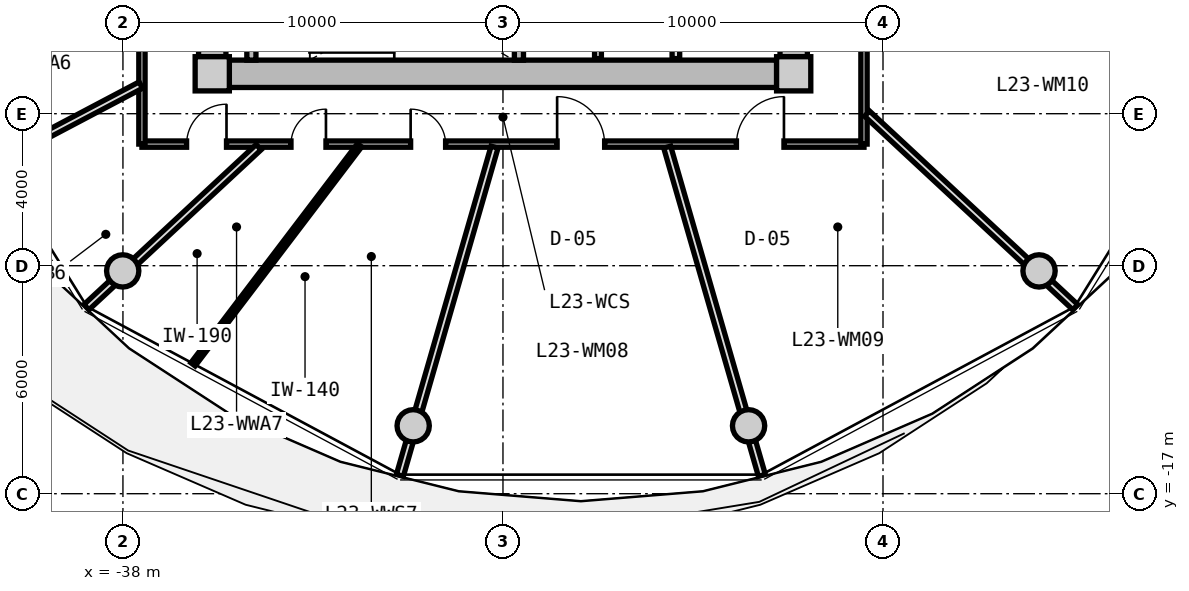
"""IFC4 building model, lengths in metres.
Left out: names, types, materials, properties, quantities, classifications, styles, units other than length and angle.
Written with IfcOpenShell. Run it as: python <this file> out.ifc"""

import sys

from ifc_helpers import new_model, si_unit, direction, frame, frame_2d, origin, origin_2d, place, context, subcontext, project, spatial, rectangle, circle, extrude, source, transform, mapped, element, fill, save


model = new_model("IFC4")
c1 = context("Model", 3, precision=1e-05, world=origin(), true_north=direction((0.0, 1.0)))
c2 = subcontext(c1, "Body", "Model", "MODEL_VIEW")
j1 = project(units=[si_unit("LENGTHUNIT", "METRE"), si_unit("PLANEANGLEUNIT", "RADIAN")], contexts=[c1])
p1 = place(None, origin())
s1 = spatial("IfcSite", under=j1, at=p1, CompositionType="ELEMENT")
p2 = place(p1, origin())
s2 = spatial("IfcBuilding", under=s1, at=p2, CompositionType="ELEMENT")
p3 = place(p2, frame((0.0, 0.0, 77.95)))
s3 = spatial("IfcBuildingStorey", under=s2, at=p3, CompositionType="ELEMENT", Elevation=77.95)
m1 = source(origin(), c2, "Body", "SweptSolid", [
    extrude(rectangle(XDim=0.9, YDim=0.9, at=origin_2d()), origin(), (0.0, 0.0, 1.0), 3.05),
])
for number, where, z_axis, x_axis in (
    (1, (-35.65, -5.95, 0.0), (0.0, 0.0, 1.0), (1.0, 0.0, 0.0)),
    (2, (-20.35, -5.95, 0.0), (0.0, 0.0, 1.0), (1.0, 0.0, 0.0)),
):
    element("IfcColumn", number, at=place(p3, frame(where, z_axis=z_axis, x_axis=x_axis)), inside=s3, PredefinedType="COLUMN", context=c2, shape_type="MappedRepresentation", body=[
        mapped(m1, transform((0.0, 0.0, 0.0), x_axis=(1.0, 0.0, 0.0), y_axis=(0.0, 1.0, 0.0), z_axis=(0.0, 0.0, 1.0), scale=1.0)),
    ])
m2 = source(origin(), c2, "Body", "SweptSolid", [
    extrude(rectangle(XDim=14.4, YDim=0.72, at=frame_2d((7.2, 0.0))), origin(), (0.0, 0.0, 1.0), 2.79),
])
p4 = place(p3, frame((-20.8, -5.95, 0.0), z_axis=(0.0, 0.0, 1.0), x_axis=(-1.0, 0.0, 0.0)))
e3 = element("IfcWall", 3, at=p4, inside=s3, PredefinedType="SHEAR", context=c2, shape_type="MappedRepresentation", body=[
    mapped(m2, transform((0.0, 0.0, 0.0), x_axis=(1.0, 0.0, 0.0), y_axis=(0.0, 1.0, 0.0), z_axis=(0.0, 0.0, 1.0), scale=1.0)),
])
m3 = source(origin(), c2, "Body", "SweptSolid", [
    extrude(rectangle(XDim=11.0, YDim=0.72, at=frame_2d((5.5, 0.0))), origin(), (0.0, 0.0, 1.0), 2.79),
])
p5 = place(p3, frame((-35.65, -5.5, 0.0), z_axis=(0.0, 0.0, 1.0), x_axis=(0.0, 1.0, 0.0)))
e4 = element("IfcWall", 4, at=p5, inside=s3, PredefinedType="SHEAR", context=c2, shape_type="MappedRepresentation", body=[
    mapped(m3, transform((0.0, 0.0, 0.0), x_axis=(1.0, 0.0, 0.0), y_axis=(0.0, 1.0, 0.0), z_axis=(0.0, 0.0, 1.0), scale=1.0)),
])
p6 = place(p5, frame((3.8, 0.0, 0.0)))
e5 = element("IfcOpeningElement", 5, at=p6, cuts=e4, PredefinedType="OPENING", context=c2, shape_type="SweptSolid", body=[
    extrude(rectangle(XDim=1.2, YDim=2.15, at=frame_2d((0.6, 1.075))), frame((0.0, 0.37, 0.0), z_axis=(0.0, -1.0, 0.0), x_axis=(1.0, 0.0, 0.0)), (0.0, 0.0, 1.0), 0.74),
])
p7 = place(p3, frame((-20.35, 5.5, 0.0), z_axis=(0.0, 0.0, 1.0), x_axis=(0.0, -1.0, 0.0)))
e6 = element("IfcWall", 6, at=p7, inside=s3, PredefinedType="SHEAR", context=c2, shape_type="MappedRepresentation", body=[
    mapped(m3, transform((0.0, 0.0, 0.0), x_axis=(1.0, 0.0, 0.0), y_axis=(0.0, 1.0, 0.0), z_axis=(0.0, 0.0, 1.0), scale=1.0)),
])
p8 = place(p7, frame((5.65, 0.0, 0.0)))
e7 = element("IfcOpeningElement", 7, at=p8, cuts=e6, PredefinedType="OPENING", context=c2, shape_type="SweptSolid", body=[
    extrude(rectangle(XDim=1.2, YDim=2.15, at=frame_2d((0.6, 1.075))), frame((0.0, 0.37, 0.0), z_axis=(0.0, -1.0, 0.0), x_axis=(1.0, 0.0, 0.0)), (0.0, 0.0, 1.0), 0.74),
])
p9 = place(p7, frame((9.3, 0.0, 0.0)))
e8 = element("IfcOpeningElement", 8, at=p9, cuts=e6, PredefinedType="OPENING", context=c2, shape_type="SweptSolid", body=[
    extrude(rectangle(XDim=1.0, YDim=2.1, at=frame_2d((0.5, 1.05))), frame((0.0, 0.37, 0.0), z_axis=(0.0, -1.0, 0.0), x_axis=(1.0, 0.0, 0.0)), (0.0, 0.0, 1.0), 0.74),
])
m4 = source(origin(), c2, "Body", "SweptSolid", [
    extrude(circle(Radius=0.425, at=origin_2d()), origin(), (0.0, 0.0, 1.0), 3.47),
])
for number, where, z_axis, x_axis in (
    (9, (-38.006, -11.137, -0.42), (0.0, 0.0, 1.0), (1.0, 0.0, 0.0)),
    (10, (-30.363, -15.213, -0.42), (0.0, 0.0, 1.0), (1.0, 0.0, 0.0)),
    (11, (-21.537, -15.213, -0.42), (0.0, 0.0, 1.0), (1.0, 0.0, 0.0)),
    (12, (-13.894, -11.137, -0.42), (0.0, 0.0, 1.0), (1.0, 0.0, 0.0)),
):
    element("IfcColumn", number, at=place(p3, frame(where, z_axis=z_axis, x_axis=x_axis)), inside=s3, PredefinedType="COLUMN", context=c2, shape_type="MappedRepresentation", body=[
        mapped(m4, transform((0.0, 0.0, 0.0), x_axis=(1.0, 0.0, 0.0), y_axis=(0.0, 1.0, 0.0), z_axis=(0.0, 0.0, 1.0), scale=1.0)),
    ])
m5 = source(origin(), c2, "Body", "SweptSolid", [
    extrude(rectangle(XDim=3.14, YDim=0.24, at=frame_2d((1.57, 0.0))), origin(), (0.0, 0.0, 1.0), 2.79),
])
for number, where, z_axis, x_axis in (
    (13, (-34.62, -5.59, 0.0), (0.0, 0.0, 1.0), (0.0, 1.0, 0.0)),
    (14, (-27.58, -5.59, 0.0), (0.0, 0.0, 1.0), (0.0, 1.0, 0.0)),
):
    element("IfcWall", number, at=place(p3, frame(where, z_axis=z_axis, x_axis=x_axis)), inside=s3, PredefinedType="PARTITIONING", context=c2, shape_type="MappedRepresentation", body=[
        mapped(m5, transform((0.0, 0.0, 0.0), x_axis=(1.0, 0.0, 0.0), y_axis=(0.0, 1.0, 0.0), z_axis=(0.0, 0.0, 1.0), scale=1.0)),
    ])
m6 = source(origin(), c2, "Body", "SweptSolid", [
    extrude(rectangle(XDim=3.8, YDim=0.2, at=frame_2d((1.9, 0.0))), origin(), (0.0, 0.0, 1.0), 2.775),
])
p10 = place(p3, frame((-23.45, -5.55, 0.0), z_axis=(0.0, 0.0, 1.0), x_axis=(0.0, 1.0, 0.0)))
e15 = element("IfcWall", 15, at=p10, inside=s3, PredefinedType="PARTITIONING", context=c2, shape_type="MappedRepresentation", body=[
    mapped(m6, transform((0.0, 0.0, 0.0), x_axis=(1.0, 0.0, 0.0), y_axis=(0.0, 1.0, 0.0), z_axis=(0.0, 0.0, 1.0), scale=1.0)),
])
m7 = source(origin(), c2, "Body", "SweptSolid", [
    extrude(rectangle(XDim=3.22, YDim=0.18, at=frame_2d((1.61, 0.0))), origin(), (0.0, 0.0, 1.0), 2.775),
])
p11 = place(p3, frame((-25.5, -5.55, 0.0), z_axis=(0.0, 0.0, 1.0), x_axis=(0.0, 1.0, 0.0)))
e16 = element("IfcWall", 16, at=p11, inside=s3, PredefinedType="PARTITIONING", context=c2, shape_type="MappedRepresentation", body=[
    mapped(m7, transform((0.0, 0.0, 0.0), x_axis=(1.0, 0.0, 0.0), y_axis=(0.0, 1.0, 0.0), z_axis=(0.0, 0.0, 1.0), scale=1.0)),
])
m8 = source(origin(), c2, "Body", "SweptSolid", [
    extrude(rectangle(XDim=19.0, YDim=0.165, at=frame_2d((9.5, 0.0))), origin(), (0.0, 0.0, 1.0), 2.775),
])
p12 = place(p3, frame((-18.5, -7.8, 0.0), z_axis=(0.0, 0.0, 1.0), x_axis=(-1.0, 0.0, 0.0)))
e17 = element("IfcWall", 17, at=p12, inside=s3, PredefinedType="PARTITIONING", context=c2, shape_type="MappedRepresentation", body=[
    mapped(m8, transform((0.0, 0.0, 0.0), x_axis=(1.0, 0.0, 0.0), y_axis=(0.0, 1.0, 0.0), z_axis=(0.0, 0.0, 1.0), scale=1.0)),
])
p13 = place(p12, frame((14.158, 0.0, 0.0)))
e18 = element("IfcOpeningElement", 18, at=p13, cuts=e17, PredefinedType="OPENING", context=c2, shape_type="SweptSolid", body=[
    extrude(rectangle(XDim=0.92, YDim=2.1, at=frame_2d((0.46, 1.05))), frame((0.0, 0.093, 0.0), z_axis=(0.0, -1.0, 0.0), x_axis=(1.0, 0.0, 0.0)), (0.0, 0.0, 1.0), 0.185),
])
p14 = place(p12, frame((11.01, 0.0, 0.0)))
e19 = element("IfcOpeningElement", 19, at=p14, cuts=e17, PredefinedType="OPENING", context=c2, shape_type="SweptSolid", body=[
    extrude(rectangle(XDim=0.92, YDim=2.1, at=frame_2d((0.46, 1.05))), frame((0.0, 0.093, 0.0), z_axis=(0.0, -1.0, 0.0), x_axis=(1.0, 0.0, 0.0)), (0.0, 0.0, 1.0), 0.185),
])
p15 = place(p12, frame((6.825, 0.0, 0.0)))
e20 = element("IfcOpeningElement", 20, at=p15, cuts=e17, PredefinedType="OPENING", context=c2, shape_type="SweptSolid", body=[
    extrude(rectangle(XDim=1.25, YDim=2.2, at=frame_2d((0.625, 1.1))), frame((0.0, 0.093, 0.0), z_axis=(0.0, -1.0, 0.0), x_axis=(1.0, 0.0, 0.0)), (0.0, 0.0, 1.0), 0.185),
])
p16 = place(p12, frame((2.106, 0.0, 0.0)))
e21 = element("IfcOpeningElement", 21, at=p16, cuts=e17, PredefinedType="OPENING", context=c2, shape_type="SweptSolid", body=[
    extrude(rectangle(XDim=1.25, YDim=2.2, at=frame_2d((0.625, 1.1))), frame((0.0, 0.093, 0.0), z_axis=(0.0, -1.0, 0.0), x_axis=(1.0, 0.0, 0.0)), (0.0, 0.0, 1.0), 0.185),
])
p17 = place(p12, frame((16.775, 0.0, 0.0)))
e22 = element("IfcOpeningElement", 22, at=p17, cuts=e17, PredefinedType="OPENING", context=c2, shape_type="SweptSolid", body=[
    extrude(rectangle(XDim=1.05, YDim=2.15, at=frame_2d((0.525, 1.075))), frame((0.0, 0.093, 0.0), z_axis=(0.0, -1.0, 0.0), x_axis=(1.0, 0.0, 0.0)), (0.0, 0.0, 1.0), 0.185),
])
m9 = source(origin(), c2, "Body", "SweptSolid", [
    extrude(rectangle(XDim=15.6, YDim=0.165, at=frame_2d((7.8, 0.0))), origin(), (0.0, 0.0, 1.0), 2.775),
])
p18 = place(p3, frame((-37.5, -7.8, 0.0), z_axis=(0.0, 0.0, 1.0), x_axis=(0.0, 1.0, 0.0)))
e23 = element("IfcWall", 23, at=p18, inside=s3, PredefinedType="PARTITIONING", context=c2, shape_type="MappedRepresentation", body=[
    mapped(m9, transform((0.0, 0.0, 0.0), x_axis=(1.0, 0.0, 0.0), y_axis=(0.0, 1.0, 0.0), z_axis=(0.0, 0.0, 1.0), scale=1.0)),
])
p19 = place(p18, frame((11.994, 0.0, 0.0)))
e24 = element("IfcOpeningElement", 24, at=p19, cuts=e23, PredefinedType="OPENING", context=c2, shape_type="SweptSolid", body=[
    extrude(rectangle(XDim=1.25, YDim=2.2, at=frame_2d((0.625, 1.1))), frame((0.0, 0.093, 0.0), z_axis=(0.0, -1.0, 0.0), x_axis=(1.0, 0.0, 0.0)), (0.0, 0.0, 1.0), 0.185),
])
p20 = place(p18, frame((8.723, 0.0, 0.0)))
e25 = element("IfcOpeningElement", 25, at=p20, cuts=e23, PredefinedType="OPENING", context=c2, shape_type="SweptSolid", body=[
    extrude(rectangle(XDim=1.05, YDim=2.15, at=frame_2d((0.525, 1.075))), frame((0.0, 0.093, 0.0), z_axis=(0.0, -1.0, 0.0), x_axis=(1.0, 0.0, 0.0)), (0.0, 0.0, 1.0), 0.185),
])
p21 = place(p18, frame((5.777, 0.0, 0.0)))
e26 = element("IfcOpeningElement", 26, at=p21, cuts=e23, PredefinedType="OPENING", context=c2, shape_type="SweptSolid", body=[
    extrude(rectangle(XDim=1.05, YDim=2.15, at=frame_2d((0.525, 1.075))), frame((0.0, 0.093, 0.0), z_axis=(0.0, -1.0, 0.0), x_axis=(1.0, 0.0, 0.0)), (0.0, 0.0, 1.0), 0.185),
])
p22 = place(p18, frame((2.676, 0.0, 0.0)))
e27 = element("IfcOpeningElement", 27, at=p22, cuts=e23, PredefinedType="OPENING", context=c2, shape_type="SweptSolid", body=[
    extrude(rectangle(XDim=1.05, YDim=2.15, at=frame_2d((0.525, 1.075))), frame((0.0, 0.093, 0.0), z_axis=(0.0, -1.0, 0.0), x_axis=(1.0, 0.0, 0.0)), (0.0, 0.0, 1.0), 0.185),
])
p23 = place(p3, frame((-18.5, 7.8, 0.0), z_axis=(0.0, 0.0, 1.0), x_axis=(0.0, -1.0, 0.0)))
e28 = element("IfcWall", 28, at=p23, inside=s3, PredefinedType="PARTITIONING", context=c2, shape_type="MappedRepresentation", body=[
    mapped(m9, transform((0.0, 0.0, 0.0), x_axis=(1.0, 0.0, 0.0), y_axis=(0.0, 1.0, 0.0), z_axis=(0.0, 0.0, 1.0), scale=1.0)),
])
p24 = place(p23, frame((11.664, 0.0, 0.0)))
e29 = element("IfcOpeningElement", 29, at=p24, cuts=e28, PredefinedType="OPENING", context=c2, shape_type="SweptSolid", body=[
    extrude(rectangle(XDim=1.25, YDim=2.2, at=frame_2d((0.625, 1.1))), frame((0.0, 0.093, 0.0), z_axis=(0.0, -1.0, 0.0), x_axis=(1.0, 0.0, 0.0)), (0.0, 0.0, 1.0), 0.185),
])
p25 = place(p23, frame((7.175, 0.0, 0.0)))
e30 = element("IfcOpeningElement", 30, at=p25, cuts=e28, PredefinedType="OPENING", context=c2, shape_type="SweptSolid", body=[
    extrude(rectangle(XDim=1.25, YDim=2.2, at=frame_2d((0.625, 1.1))), frame((0.0, 0.093, 0.0), z_axis=(0.0, -1.0, 0.0), x_axis=(1.0, 0.0, 0.0)), (0.0, 0.0, 1.0), 0.185),
])
p26 = place(p23, frame((2.686, 0.0, 0.0)))
e31 = element("IfcOpeningElement", 31, at=p26, cuts=e28, PredefinedType="OPENING", context=c2, shape_type="SweptSolid", body=[
    extrude(rectangle(XDim=1.25, YDim=2.2, at=frame_2d((0.625, 1.1))), frame((0.0, 0.093, 0.0), z_axis=(0.0, -1.0, 0.0), x_axis=(1.0, 0.0, 0.0)), (0.0, 0.0, 1.0), 0.185),
])
m10 = source(origin(), c2, "Body", "SweptSolid", [
    extrude(rectangle(XDim=6.187, YDim=0.19, at=frame_2d((3.093, 0.0))), origin(), (0.0, 0.0, 1.0), 2.275),
])
p27 = place(p3, frame((-34.429, -7.88, 0.0), z_axis=(0.0, 0.0, 1.0), x_axis=(-0.732501077882, -0.680765870841, 0.0)))
e32 = element("IfcWall", 32, at=p27, inside=s3, PredefinedType="PARTITIONING", context=c2, shape_type="MappedRepresentation", body=[
    mapped(m10, transform((0.0, 0.0, 0.0), x_axis=(1.0, 0.0, 0.0), y_axis=(0.0, 1.0, 0.0), z_axis=(0.0, 0.0, 1.0), scale=1.0)),
])
m11 = source(origin(), c2, "Body", "SweptSolid", [
    extrude(rectangle(XDim=8.989, YDim=0.19, at=frame_2d((4.495, 0.0))), origin(), (0.0, 0.0, 1.0), 2.275),
])
p28 = place(p3, frame((-28.222, -7.88, 0.0), z_axis=(0.0, 0.0, 1.0), x_axis=(-0.27702323008, -0.960863221274, 0.0)))
e33 = element("IfcWall", 33, at=p28, inside=s3, PredefinedType="PARTITIONING", context=c2, shape_type="MappedRepresentation", body=[
    mapped(m11, transform((0.0, 0.0, 0.0), x_axis=(1.0, 0.0, 0.0), y_axis=(0.0, 1.0, 0.0), z_axis=(0.0, 0.0, 1.0), scale=1.0)),
])
m12 = source(origin(), c2, "Body", "SweptSolid", [
    extrude(rectangle(XDim=7.243, YDim=0.14, at=frame_2d((3.621, 0.0))), origin(), (0.0, 0.0, 1.0), 2.775),
])
p29 = place(p3, frame((-31.774, -7.83, 0.0), z_axis=(0.0, 0.0, 1.0), x_axis=(-0.605111472002, -0.796140757939, 0.0)))
e34 = element("IfcWall", 34, at=p29, inside=s3, PredefinedType="PARTITIONING", context=c2, shape_type="MappedRepresentation", body=[
    mapped(m12, transform((0.0, 0.0, 0.0), x_axis=(1.0, 0.0, 0.0), y_axis=(0.0, 1.0, 0.0), z_axis=(0.0, 0.0, 1.0), scale=1.0)),
])
p30 = place(p3, frame((-23.678, -7.88, 0.0), z_axis=(0.0, 0.0, 1.0), x_axis=(0.27702323008, -0.960863221274, 0.0)))
e35 = element("IfcWall", 35, at=p30, inside=s3, PredefinedType="PARTITIONING", context=c2, shape_type="MappedRepresentation", body=[
    mapped(m11, transform((0.0, 0.0, 0.0), x_axis=(1.0, 0.0, 0.0), y_axis=(0.0, 1.0, 0.0), z_axis=(0.0, 0.0, 1.0), scale=1.0)),
])
m13 = source(origin(), c2, "Body", "SweptSolid", [
    extrude(rectangle(XDim=7.482, YDim=0.19, at=frame_2d((3.741, 0.0))), origin(), (0.0, 0.0, 1.0), 2.275),
])
p31 = place(p3, frame((-18.42, -6.998, 0.0), z_axis=(0.0, 0.0, 1.0), x_axis=(0.732508698043, -0.680757671489, 0.0)))
e36 = element("IfcWall", 36, at=p31, inside=s3, PredefinedType="PARTITIONING", context=c2, shape_type="MappedRepresentation", body=[
    mapped(m13, transform((0.0, 0.0, 0.0), x_axis=(1.0, 0.0, 0.0), y_axis=(0.0, 1.0, 0.0), z_axis=(0.0, 0.0, 1.0), scale=1.0)),
])
m14 = source(origin(), c2, "Body", "SweptSolid", [
    extrude(rectangle(XDim=4.31, YDim=0.19, at=frame_2d((2.155, 0.0))), origin(), (0.0, 0.0, 1.0), 2.775),
])
p32 = place(p3, frame((-37.53, -6.248, 0.0), z_axis=(0.0, 0.0, 1.0), x_axis=(-0.884459441503, -0.466617076773, 0.0)))
e37 = element("IfcWall", 37, at=p32, inside=s3, PredefinedType="PARTITIONING", context=c2, shape_type="MappedRepresentation", body=[
    mapped(m14, transform((0.0, 0.0, 0.0), x_axis=(1.0, 0.0, 0.0), y_axis=(0.0, 1.0, 0.0), z_axis=(0.0, 0.0, 1.0), scale=1.0)),
])
m15 = source(origin(), c2, "Body", "SweptSolid", [
    extrude(rectangle(XDim=0.92, YDim=2.1, at=frame_2d((0.46, 1.05))), frame((0.0, 0.025, 0.0), z_axis=(0.0, -1.0, 0.0), x_axis=(1.0, 0.0, 0.0)), (0.0, 0.0, 1.0), 0.05),
])
p33 = place(p13, frame((0.92, 0.0, 0.0), z_axis=(0.0, 0.0, 1.0), x_axis=(-1.0, 0.0, 0.0)))
e38 = element("IfcDoor", 38, at=p33, inside=s3, OperationType="SINGLE_SWING_RIGHT", PredefinedType="DOOR", context=c2, shape_type="MappedRepresentation", body=[
    mapped(m15, transform((0.0, 0.0, 0.0), x_axis=(1.0, 0.0, 0.0), y_axis=(0.0, 1.0, 0.0), z_axis=(0.0, 0.0, 1.0), scale=1.0)),
])
fill(e18, e38)
p34 = place(p14, frame((0.92, 0.0, 0.0), z_axis=(0.0, 0.0, 1.0), x_axis=(-1.0, 0.0, 0.0)))
e39 = element("IfcDoor", 39, at=p34, inside=s3, OperationType="SINGLE_SWING_LEFT", PredefinedType="DOOR", context=c2, shape_type="MappedRepresentation", body=[
    mapped(m15, transform((0.0, 0.0, 0.0), x_axis=(1.0, 0.0, 0.0), y_axis=(0.0, 1.0, 0.0), z_axis=(0.0, 0.0, 1.0), scale=1.0)),
])
fill(e19, e39)
m16 = source(origin(), c2, "Body", "SweptSolid", [
    extrude(rectangle(XDim=1.25, YDim=2.2, at=frame_2d((0.625, 1.1))), frame((0.0, 0.025, 0.0), z_axis=(0.0, -1.0, 0.0), x_axis=(1.0, 0.0, 0.0)), (0.0, 0.0, 1.0), 0.05),
])
p35 = place(p15, frame((1.25, 0.0, 0.0), z_axis=(0.0, 0.0, 1.0), x_axis=(-1.0, 0.0, 0.0)))
e40 = element("IfcDoor", 40, at=p35, inside=s3, OperationType="SINGLE_SWING_LEFT", PredefinedType="DOOR", context=c2, shape_type="MappedRepresentation", body=[
    mapped(m16, transform((0.0, 0.0, 0.0), x_axis=(1.0, 0.0, 0.0), y_axis=(0.0, 1.0, 0.0), z_axis=(0.0, 0.0, 1.0), scale=1.0)),
])
fill(e20, e40)
p36 = place(p16, frame((1.25, 0.0, 0.0), z_axis=(0.0, 0.0, 1.0), x_axis=(-1.0, 0.0, 0.0)))
e41 = element("IfcDoor", 41, at=p36, inside=s3, OperationType="SINGLE_SWING_RIGHT", PredefinedType="DOOR", context=c2, shape_type="MappedRepresentation", body=[
    mapped(m16, transform((0.0, 0.0, 0.0), x_axis=(1.0, 0.0, 0.0), y_axis=(0.0, 1.0, 0.0), z_axis=(0.0, 0.0, 1.0), scale=1.0)),
])
fill(e21, e41)
m17 = source(origin(), c2, "Body", "SweptSolid", [
    extrude(rectangle(XDim=1.05, YDim=2.15, at=frame_2d((0.525, 1.075))), frame((0.0, 0.025, 0.0), z_axis=(0.0, -1.0, 0.0), x_axis=(1.0, 0.0, 0.0)), (0.0, 0.0, 1.0), 0.05),
])
p37 = place(p17, frame((1.05, 0.0, 0.0), z_axis=(0.0, 0.0, 1.0), x_axis=(-1.0, 0.0, 0.0)))
e42 = element("IfcDoor", 42, at=p37, inside=s3, OperationType="SINGLE_SWING_RIGHT", PredefinedType="DOOR", context=c2, shape_type="MappedRepresentation", body=[
    mapped(m17, transform((0.0, 0.0, 0.0), x_axis=(1.0, 0.0, 0.0), y_axis=(0.0, 1.0, 0.0), z_axis=(0.0, 0.0, 1.0), scale=1.0)),
])
fill(e22, e42)
save(model, sys.argv[1])
